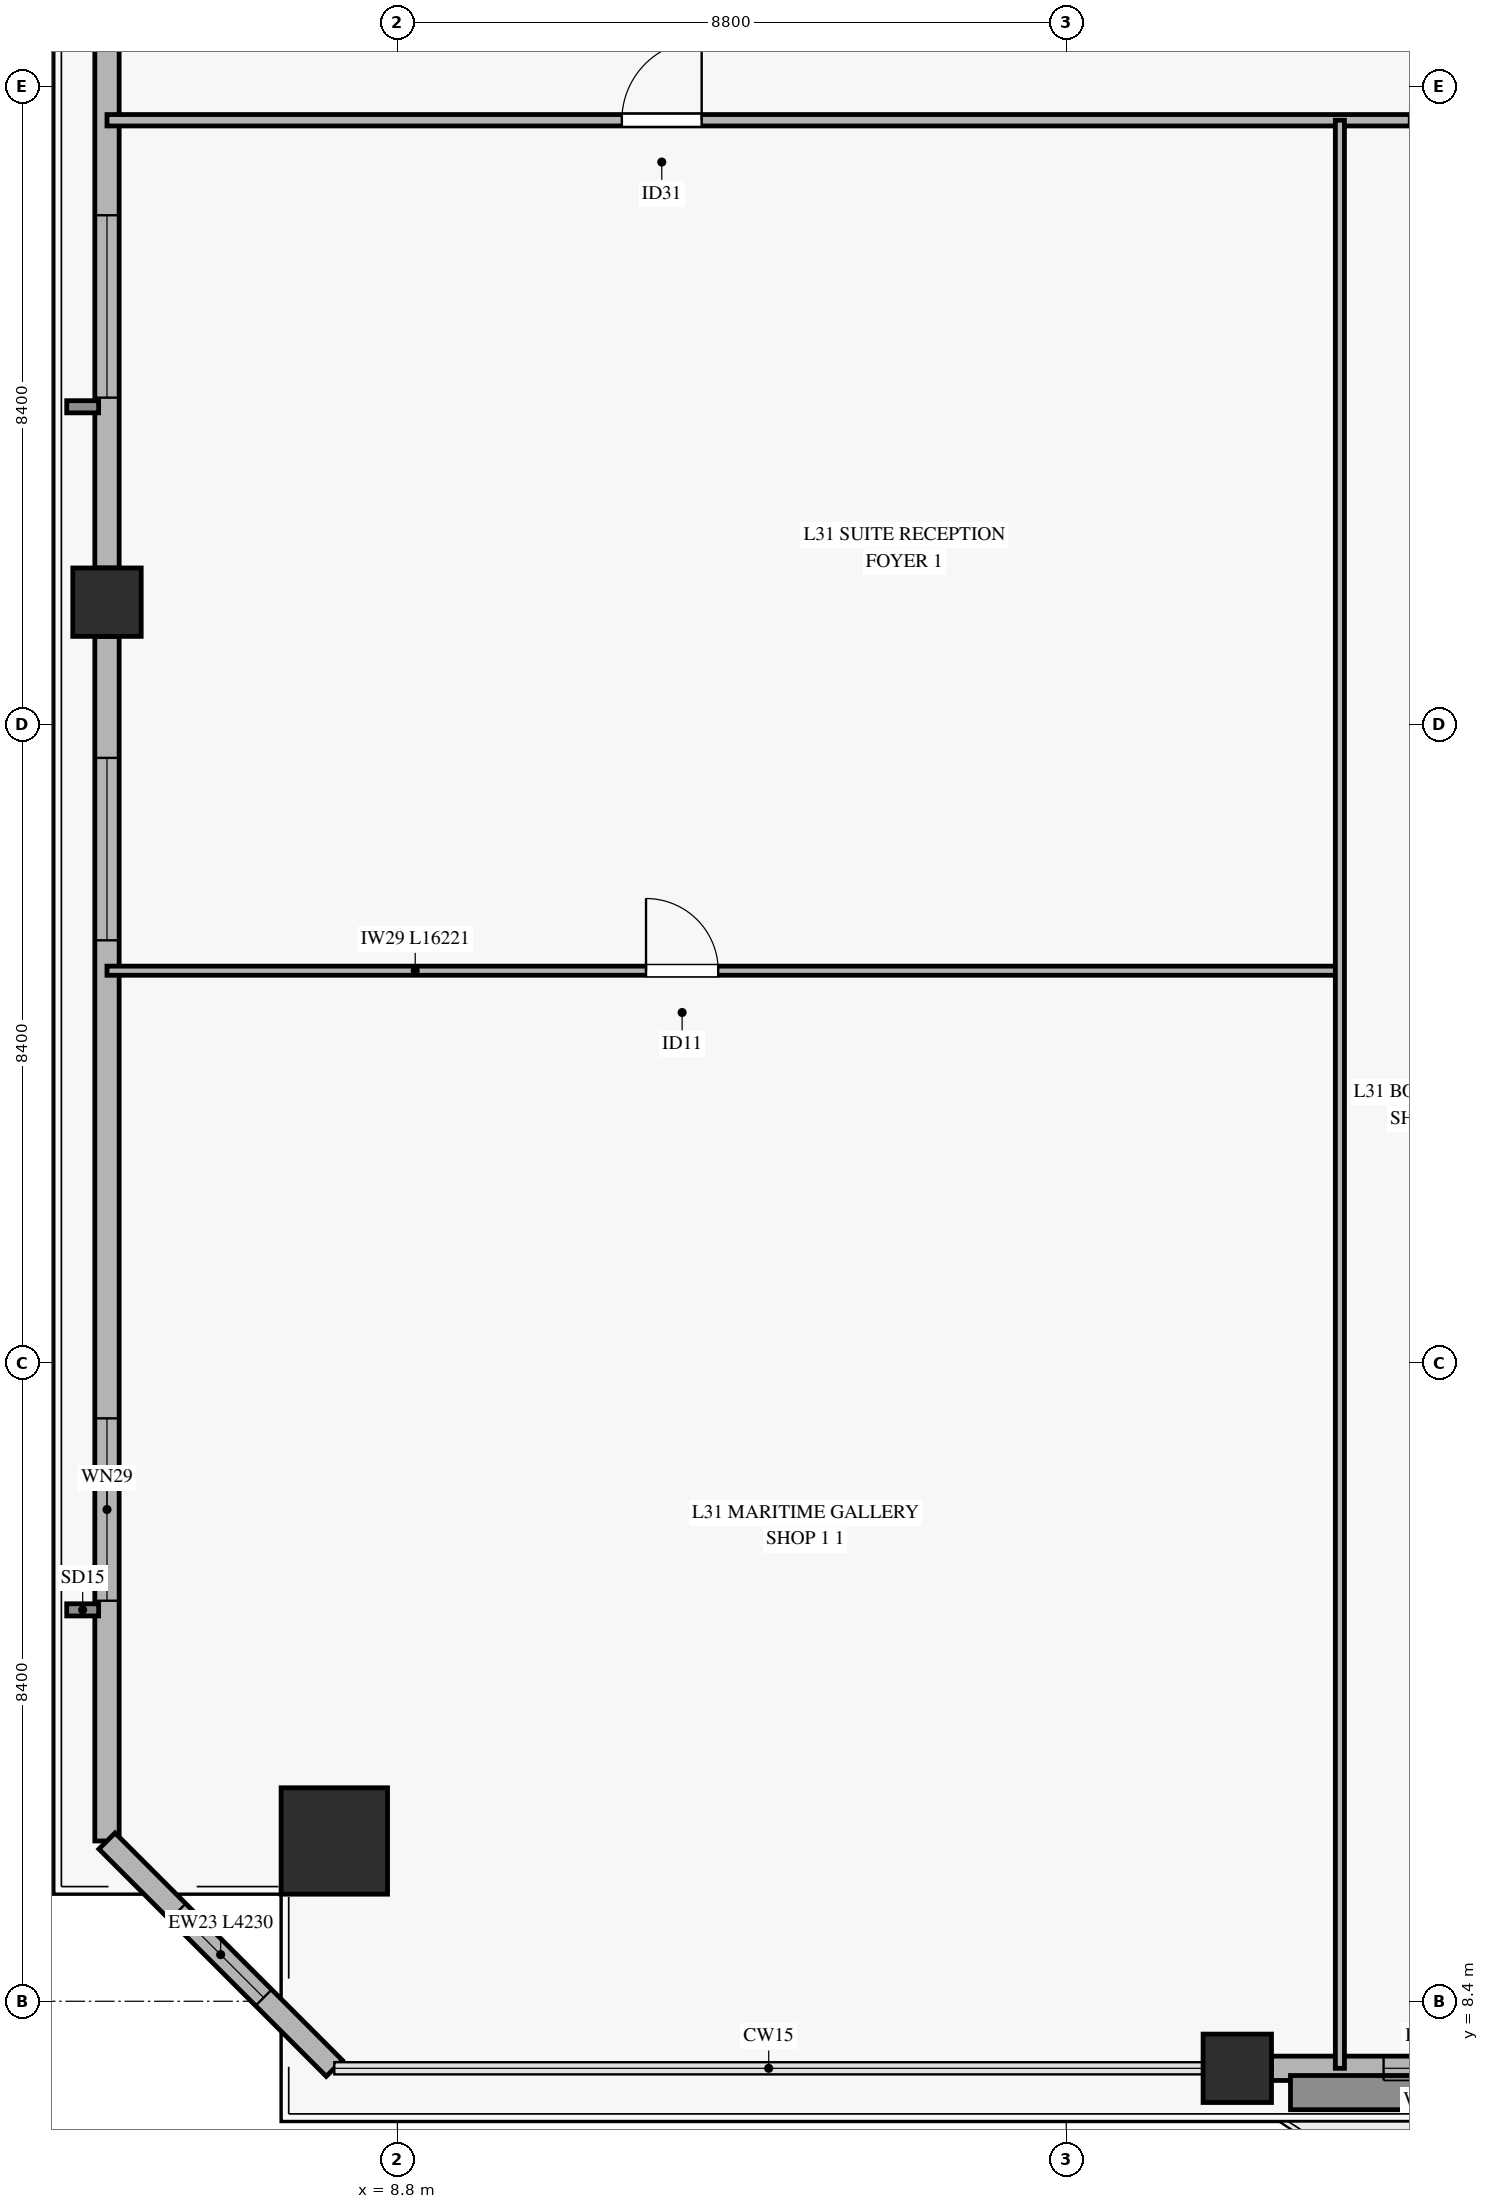
"""IFC4 building model, lengths in metres.
Left out: names, types, materials, properties, quantities, classifications, styles, units other than length and angle.
Written with IfcOpenShell. Run it as: python <this file> out.ifc"""

import sys

from ifc_helpers import new_model, si_unit, direction, frame, frame_2d, origin, origin_2d, place, context, subcontext, project, spatial, rectangle, hollow_rectangle, extrude, source, transform, mapped, element, fill, save


model = new_model("IFC4")
c1 = context("Model", 3, precision=1e-05, world=origin(), true_north=direction((0.0, 1.0)))
c2 = subcontext(c1, "Body", "Model", "MODEL_VIEW")
j1 = project(units=[si_unit("LENGTHUNIT", "METRE"), si_unit("PLANEANGLEUNIT", "RADIAN")], contexts=[c1])
p1 = place(None, origin())
s1 = spatial("IfcSite", under=j1, at=p1, CompositionType="ELEMENT")
p2 = place(p1, origin())
s2 = spatial("IfcBuilding", under=s1, at=p2, CompositionType="ELEMENT")
p3 = place(p2, frame((0.0, 0.0, 127.0)))
s3 = spatial("IfcBuildingStorey", under=s2, at=p3, CompositionType="ELEMENT", Elevation=127.0)
m1 = source(origin(), c2, "Body", "SweptSolid", [
    extrude(hollow_rectangle(XDim=1.4, YDim=1.4, WallThickness=0.065, at=origin_2d()), origin(), (0.0, 0.0, 1.0), 3.64),
])
p4 = place(p3, frame((7.97, 10.509, 0.0), z_axis=(0.0, 0.0, 1.0), x_axis=(1.0, 0.0, 0.0)))
e1 = element("IfcColumn", 1, at=p4, inside=s3, PredefinedType="COLUMN", context=c2, shape_type="MappedRepresentation", body=[
    mapped(m1, transform((0.0, 0.0, 0.0), x_axis=(1.0, 0.0, 0.0), y_axis=(0.0, 1.0, 0.0), z_axis=(0.0, 0.0, 1.0), scale=1.0)),
])
m2 = source(origin(), c2, "Body", "SweptSolid", [
    extrude(hollow_rectangle(XDim=0.9, YDim=0.9, WallThickness=0.04, at=origin_2d()), origin(), (0.0, 0.0, 1.0), 3.64),
])
for number, where, z_axis, x_axis in (
    (2, (19.85, 7.518, 0.0), (0.0, 0.0, 1.0), (1.0, 0.0, 0.0)),
    (3, (4.979, 26.809, 0.0), (0.0, 0.0, 1.0), (1.0, 0.0, 0.0)),
):
    element("IfcColumn", number, at=place(p3, frame(where, z_axis=z_axis, x_axis=x_axis)), inside=s3, PredefinedType="COLUMN", context=c2, shape_type="MappedRepresentation", body=[
        mapped(m2, transform((0.0, 0.0, 0.0), x_axis=(1.0, 0.0, 0.0), y_axis=(0.0, 1.0, 0.0), z_axis=(0.0, 0.0, 1.0), scale=1.0)),
    ])
p5 = place(p3, frame((20.3, 7.518, 0.0), z_axis=(0.0, 0.0, 1.0), x_axis=(1.0, 0.0, 0.0)))
e4 = element("IfcWall", 4, at=p5, inside=s3, PredefinedType="SOLIDWALL", context=c2, shape_type="SweptSolid", body=[
    extrude(rectangle(XDim=10.05, YDim=0.32, at=frame_2d((5.025, 0.0))), origin(), (0.0, 0.0, 1.0), 3.12),
])
p6 = place(p5, frame((4.1, 0.0, 0.0)))
e5 = element("IfcOpeningElement", 5, at=p6, cuts=e4, PredefinedType="OPENING", context=c2, shape_type="SweptSolid", body=[
    extrude(rectangle(XDim=1.8, YDim=2.25, at=frame_2d((0.9, 1.125))), frame((0.0, 0.17, 0.0), z_axis=(0.0, -1.0, 0.0), x_axis=(1.0, 0.0, 0.0)), (0.0, 0.0, 1.0), 0.34),
])
p7 = place(p5, frame((1.475, 0.0, 0.45)))
e6 = element("IfcOpeningElement", 6, at=p7, cuts=e4, PredefinedType="OPENING", context=c2, shape_type="SweptSolid", body=[
    extrude(rectangle(XDim=1.2, YDim=2.0, at=frame_2d((0.6, 1.0))), frame((0.0, 0.17, 0.0), z_axis=(0.0, -1.0, 0.0), x_axis=(1.0, 0.0, 0.0)), (0.0, 0.0, 1.0), 0.34),
])
p8 = place(p5, frame((7.1, 0.0, 0.45)))
e7 = element("IfcOpeningElement", 7, at=p8, cuts=e4, PredefinedType="OPENING", context=c2, shape_type="SweptSolid", body=[
    extrude(rectangle(XDim=1.6, YDim=2.0, at=frame_2d((0.8, 1.0))), frame((0.0, 0.17, 0.0), z_axis=(0.0, -1.0, 0.0), x_axis=(1.0, 0.0, 0.0)), (0.0, 0.0, 1.0), 0.34),
])
p9 = place(p3, frame((4.979, 10.509, 0.0), z_axis=(0.0, 0.0, 1.0), x_axis=(0.0, 1.0, 0.0)))
e8 = element("IfcWall", 8, at=p9, inside=s3, PredefinedType="SOLIDWALL", context=c2, shape_type="SweptSolid", body=[
    extrude(rectangle(XDim=15.85, YDim=0.32, at=frame_2d((7.925, 0.0))), origin(), (0.0, 0.0, 1.0), 3.12),
])
p10 = place(p9, frame((3.161, 0.0, 0.45)))
e9 = element("IfcOpeningElement", 9, at=p10, cuts=e8, PredefinedType="OPENING", context=c2, shape_type="SweptSolid", body=[
    extrude(rectangle(XDim=2.4, YDim=2.1, at=frame_2d((1.2, 1.05))), frame((0.0, 0.17, 0.0), z_axis=(0.0, -1.0, 0.0), x_axis=(1.0, 0.0, 0.0)), (0.0, 0.0, 1.0), 0.34),
])
p11 = place(p9, frame((11.851, 0.0, 0.45)))
e10 = element("IfcOpeningElement", 10, at=p11, cuts=e8, PredefinedType="OPENING", context=c2, shape_type="SweptSolid", body=[
    extrude(rectangle(XDim=2.4, YDim=2.1, at=frame_2d((1.2, 1.05))), frame((0.0, 0.17, 0.0), z_axis=(0.0, -1.0, 0.0), x_axis=(1.0, 0.0, 0.0)), (0.0, 0.0, 1.0), 0.34),
])
p12 = place(p3, frame((4.979, 27.259, 0.0), z_axis=(0.0, 0.0, 1.0), x_axis=(0.0, 1.0, 0.0)))
e11 = element("IfcWall", 11, at=p12, inside=s3, PredefinedType="SOLIDWALL", context=c2, shape_type="SweptSolid", body=[
    extrude(rectangle(XDim=15.85, YDim=0.32, at=frame_2d((7.925, 0.0))), origin(), (0.0, 0.0, 1.0), 3.12),
])
p13 = place(p12, frame((2.241, 0.0, 0.45)))
e12 = element("IfcOpeningElement", 12, at=p13, cuts=e11, PredefinedType="OPENING", context=c2, shape_type="SweptSolid", body=[
    extrude(rectangle(XDim=2.4, YDim=2.1, at=frame_2d((1.2, 1.05))), frame((0.0, 0.17, 0.0), z_axis=(0.0, -1.0, 0.0), x_axis=(1.0, 0.0, 0.0)), (0.0, 0.0, 1.0), 0.34),
])
p14 = place(p12, frame((12.708, 0.0, 0.45)))
e13 = element("IfcOpeningElement", 13, at=p14, cuts=e11, PredefinedType="OPENING", context=c2, shape_type="SweptSolid", body=[
    extrude(rectangle(XDim=2.4, YDim=2.1, at=frame_2d((1.2, 1.05))), frame((0.0, 0.17, 0.0), z_axis=(0.0, -1.0, 0.0), x_axis=(1.0, 0.0, 0.0)), (0.0, 0.0, 1.0), 0.34),
])
p15 = place(p3, frame((4.979, 10.509, 0.0), z_axis=(0.0, 0.0, 1.0), x_axis=(0.707106781187, -0.707106781187, 0.0)))
e14 = element("IfcWall", 14, at=p15, inside=s3, PredefinedType="SOLIDWALL", context=c2, shape_type="SweptSolid", body=[
    extrude(rectangle(XDim=4.23, YDim=0.3, at=frame_2d((2.115, 0.0))), origin(), (0.0, 0.0, 1.0), 3.12),
])
p16 = place(p15, frame((1.315, 0.0, 0.45)))
e15 = element("IfcOpeningElement", 15, at=p16, cuts=e14, PredefinedType="OPENING", context=c2, shape_type="SweptSolid", body=[
    extrude(rectangle(XDim=1.6, YDim=2.0, at=frame_2d((0.8, 1.0))), frame((0.0, 0.16, 0.0), z_axis=(0.0, -1.0, 0.0), x_axis=(1.0, 0.0, 0.0)), (0.0, 0.0, 1.0), 0.32),
])
p17 = place(p3, frame((4.979, 33.15, 0.0), z_axis=(0.0, 0.0, 1.0), x_axis=(1.0, 0.0, 0.0)))
e16 = element("IfcWall", 16, at=p17, inside=s3, PredefinedType="PARTITIONING", context=c2, shape_type="SweptSolid", body=[
    extrude(rectangle(XDim=60.442, YDim=0.15, at=frame_2d((30.221, 0.0))), origin(), (0.0, 0.0, 1.0), 2.725),
])
p18 = place(p17, frame((6.774, 0.0, 0.0)))
e17 = element("IfcOpeningElement", 17, at=p18, cuts=e16, PredefinedType="OPENING", context=c2, shape_type="SweptSolid", body=[
    extrude(rectangle(XDim=1.05, YDim=2.15, at=frame_2d((0.525, 1.075))), frame((0.0, 0.085, 0.0), z_axis=(0.0, -1.0, 0.0), x_axis=(1.0, 0.0, 0.0)), (0.0, 0.0, 1.0), 0.17),
])
p19 = place(p17, frame((17.131, 0.0, 0.0)))
e18 = element("IfcOpeningElement", 18, at=p19, cuts=e16, PredefinedType="OPENING", context=c2, shape_type="SweptSolid", body=[
    extrude(rectangle(XDim=1.05, YDim=2.15, at=frame_2d((0.525, 1.075))), frame((0.0, 0.085, 0.0), z_axis=(0.0, -1.0, 0.0), x_axis=(1.0, 0.0, 0.0)), (0.0, 0.0, 1.0), 0.17),
])
p20 = place(p17, frame((21.191, 0.0, 0.0)))
e19 = element("IfcOpeningElement", 19, at=p20, cuts=e16, PredefinedType="OPENING", context=c2, shape_type="SweptSolid", body=[
    extrude(rectangle(XDim=1.05, YDim=2.15, at=frame_2d((0.525, 1.075))), frame((0.0, 0.085, 0.0), z_axis=(0.0, -1.0, 0.0), x_axis=(1.0, 0.0, 0.0)), (0.0, 0.0, 1.0), 0.17),
])
p21 = place(p17, frame((26.768, 0.0, 0.0)))
e20 = element("IfcOpeningElement", 20, at=p21, cuts=e16, PredefinedType="OPENING", context=c2, shape_type="SweptSolid", body=[
    extrude(rectangle(XDim=1.05, YDim=2.15, at=frame_2d((0.525, 1.075))), frame((0.0, 0.085, 0.0), z_axis=(0.0, -1.0, 0.0), x_axis=(1.0, 0.0, 0.0)), (0.0, 0.0, 1.0), 0.17),
])
p22 = place(p17, frame((31.968, 0.0, 0.0)))
e21 = element("IfcOpeningElement", 21, at=p22, cuts=e16, PredefinedType="OPENING", context=c2, shape_type="SweptSolid", body=[
    extrude(rectangle(XDim=1.05, YDim=2.15, at=frame_2d((0.525, 1.075))), frame((0.0, 0.085, 0.0), z_axis=(0.0, -1.0, 0.0), x_axis=(1.0, 0.0, 0.0)), (0.0, 0.0, 1.0), 0.17),
])
p23 = place(p17, frame((37.084, 0.0, 0.0)))
e22 = element("IfcOpeningElement", 22, at=p23, cuts=e16, PredefinedType="OPENING", context=c2, shape_type="SweptSolid", body=[
    extrude(rectangle(XDim=1.05, YDim=2.15, at=frame_2d((0.525, 1.075))), frame((0.0, 0.085, 0.0), z_axis=(0.0, -1.0, 0.0), x_axis=(1.0, 0.0, 0.0)), (0.0, 0.0, 1.0), 0.17),
])
p24 = place(p17, frame((41.832, 0.0, 0.0)))
e23 = element("IfcOpeningElement", 23, at=p24, cuts=e16, PredefinedType="OPENING", context=c2, shape_type="SweptSolid", body=[
    extrude(rectangle(XDim=1.05, YDim=2.15, at=frame_2d((0.525, 1.075))), frame((0.0, 0.085, 0.0), z_axis=(0.0, -1.0, 0.0), x_axis=(1.0, 0.0, 0.0)), (0.0, 0.0, 1.0), 0.17),
])
p25 = place(p17, frame((50.795, 0.0, 0.0)))
e24 = element("IfcOpeningElement", 24, at=p25, cuts=e16, PredefinedType="OPENING", context=c2, shape_type="SweptSolid", body=[
    extrude(rectangle(XDim=1.05, YDim=2.15, at=frame_2d((0.525, 1.075))), frame((0.0, 0.085, 0.0), z_axis=(0.0, -1.0, 0.0), x_axis=(1.0, 0.0, 0.0)), (0.0, 0.0, 1.0), 0.17),
])
p26 = place(p3, frame((4.979, 21.96, 0.0), z_axis=(0.0, 0.0, 1.0), x_axis=(1.0, 0.0, 0.0)))
e25 = element("IfcWall", 25, at=p26, inside=s3, PredefinedType="PARTITIONING", context=c2, shape_type="SweptSolid", body=[
    extrude(rectangle(XDim=16.221, YDim=0.12, at=frame_2d((8.11, 0.0))), origin(), (0.0, 0.0, 1.0), 2.725),
])
p27 = place(p26, frame((7.092, 0.0, 0.0)))
e26 = element("IfcOpeningElement", 26, at=p27, cuts=e25, PredefinedType="OPENING", context=c2, shape_type="SweptSolid", body=[
    extrude(rectangle(XDim=0.95, YDim=2.1, at=frame_2d((0.475, 1.05))), frame((0.0, 0.07, 0.0), z_axis=(0.0, -1.0, 0.0), x_axis=(1.0, 0.0, 0.0)), (0.0, 0.0, 1.0), 0.14),
])
p28 = place(p3, frame((21.2, 7.518, 0.0), z_axis=(0.0, 0.0, 1.0), x_axis=(0.0, 1.0, 0.0)))
e27 = element("IfcWall", 27, at=p28, inside=s3, PredefinedType="PARTITIONING", context=c2, shape_type="SweptSolid", body=[
    extrude(rectangle(XDim=25.632, YDim=0.12, at=frame_2d((12.816, 0.0))), origin(), (0.0, 0.0, 1.0), 3.125),
])
m3 = source(origin(), c2, "Body", "SweptSolid", [
    extrude(rectangle(XDim=1.2, YDim=2.0, at=frame_2d((0.6, 1.0))), frame((0.0, 0.03, 0.0), z_axis=(0.0, -1.0, 0.0), x_axis=(1.0, 0.0, 0.0)), (0.0, 0.0, 1.0), 0.06),
])
p29 = place(p7, origin())
e28 = element("IfcWindow", 28, at=p29, inside=s3, PartitioningType="SINGLE_PANEL", PredefinedType="WINDOW", context=c2, shape_type="MappedRepresentation", body=[
    mapped(m3, transform((0.0, 0.0, 0.0), x_axis=(1.0, 0.0, 0.0), y_axis=(0.0, 1.0, 0.0), z_axis=(0.0, 0.0, 1.0), scale=1.0)),
])
fill(e6, e28)
m4 = source(origin(), c2, "Body", "SweptSolid", [
    extrude(rectangle(XDim=2.4, YDim=2.1, at=frame_2d((1.2, 1.05))), frame((0.0, 0.03, 0.0), z_axis=(0.0, -1.0, 0.0), x_axis=(1.0, 0.0, 0.0)), (0.0, 0.0, 1.0), 0.06),
])
p30 = place(p10, origin())
e29 = element("IfcWindow", 29, at=p30, inside=s3, PartitioningType="SINGLE_PANEL", PredefinedType="WINDOW", context=c2, shape_type="MappedRepresentation", body=[
    mapped(m4, transform((0.0, 0.0, 0.0), x_axis=(1.0, 0.0, 0.0), y_axis=(0.0, 1.0, 0.0), z_axis=(0.0, 0.0, 1.0), scale=1.0)),
])
fill(e9, e29)
p31 = place(p11, origin())
e30 = element("IfcWindow", 30, at=p31, inside=s3, PartitioningType="SINGLE_PANEL", PredefinedType="WINDOW", context=c2, shape_type="MappedRepresentation", body=[
    mapped(m4, transform((0.0, 0.0, 0.0), x_axis=(1.0, 0.0, 0.0), y_axis=(0.0, 1.0, 0.0), z_axis=(0.0, 0.0, 1.0), scale=1.0)),
])
fill(e10, e30)
p32 = place(p13, origin())
e31 = element("IfcWindow", 31, at=p32, inside=s3, PartitioningType="SINGLE_PANEL", PredefinedType="WINDOW", context=c2, shape_type="MappedRepresentation", body=[
    mapped(m4, transform((0.0, 0.0, 0.0), x_axis=(1.0, 0.0, 0.0), y_axis=(0.0, 1.0, 0.0), z_axis=(0.0, 0.0, 1.0), scale=1.0)),
])
fill(e12, e31)
m5 = source(origin(), c2, "Body", "SweptSolid", [
    extrude(rectangle(XDim=1.6, YDim=2.0, at=frame_2d((0.8, 1.0))), frame((0.0, 0.03, 0.0), z_axis=(0.0, -1.0, 0.0), x_axis=(1.0, 0.0, 0.0)), (0.0, 0.0, 1.0), 0.06),
])
p33 = place(p16, origin())
e32 = element("IfcWindow", 32, at=p33, inside=s3, PartitioningType="SINGLE_PANEL", PredefinedType="WINDOW", context=c2, shape_type="MappedRepresentation", body=[
    mapped(m5, transform((0.0, 0.0, 0.0), x_axis=(1.0, 0.0, 0.0), y_axis=(0.0, 1.0, 0.0), z_axis=(0.0, 0.0, 1.0), scale=1.0)),
])
fill(e15, e32)
m6 = source(origin(), c2, "Body", "SweptSolid", [
    extrude(rectangle(XDim=1.05, YDim=2.15, at=frame_2d((0.525, 1.075))), frame((0.0, 0.025, 0.0), z_axis=(0.0, -1.0, 0.0), x_axis=(1.0, 0.0, 0.0)), (0.0, 0.0, 1.0), 0.05),
])
p34 = place(p18, origin())
e33 = element("IfcDoor", 33, at=p34, inside=s3, OperationType="SINGLE_SWING_RIGHT", PredefinedType="DOOR", context=c2, shape_type="MappedRepresentation", body=[
    mapped(m6, transform((0.0, 0.0, 0.0), x_axis=(1.0, 0.0, 0.0), y_axis=(0.0, 1.0, 0.0), z_axis=(0.0, 0.0, 1.0), scale=1.0)),
])
fill(e17, e33)
m7 = source(origin(), c2, "Body", "SweptSolid", [
    extrude(rectangle(XDim=0.95, YDim=2.1, at=frame_2d((0.475, 1.05))), frame((0.0, 0.025, 0.0), z_axis=(0.0, -1.0, 0.0), x_axis=(1.0, 0.0, 0.0)), (0.0, 0.0, 1.0), 0.05),
])
p35 = place(p27, origin())
e34 = element("IfcDoor", 34, at=p35, inside=s3, OperationType="SINGLE_SWING_LEFT", PredefinedType="DOOR", context=c2, shape_type="MappedRepresentation", body=[
    mapped(m7, transform((0.0, 0.0, 0.0), x_axis=(1.0, 0.0, 0.0), y_axis=(0.0, 1.0, 0.0), z_axis=(0.0, 0.0, 1.0), scale=1.0)),
])
fill(e26, e34)
p36 = place(p19, origin())
e35 = element("IfcDoor", 35, at=p36, inside=s3, OperationType="SINGLE_SWING_RIGHT", PredefinedType="DOOR", context=c2, shape_type="MappedRepresentation", body=[
    mapped(m6, transform((0.0, 0.0, 0.0), x_axis=(1.0, 0.0, 0.0), y_axis=(0.0, 1.0, 0.0), z_axis=(0.0, 0.0, 1.0), scale=1.0)),
])
fill(e18, e35)
save(model, sys.argv[1])
